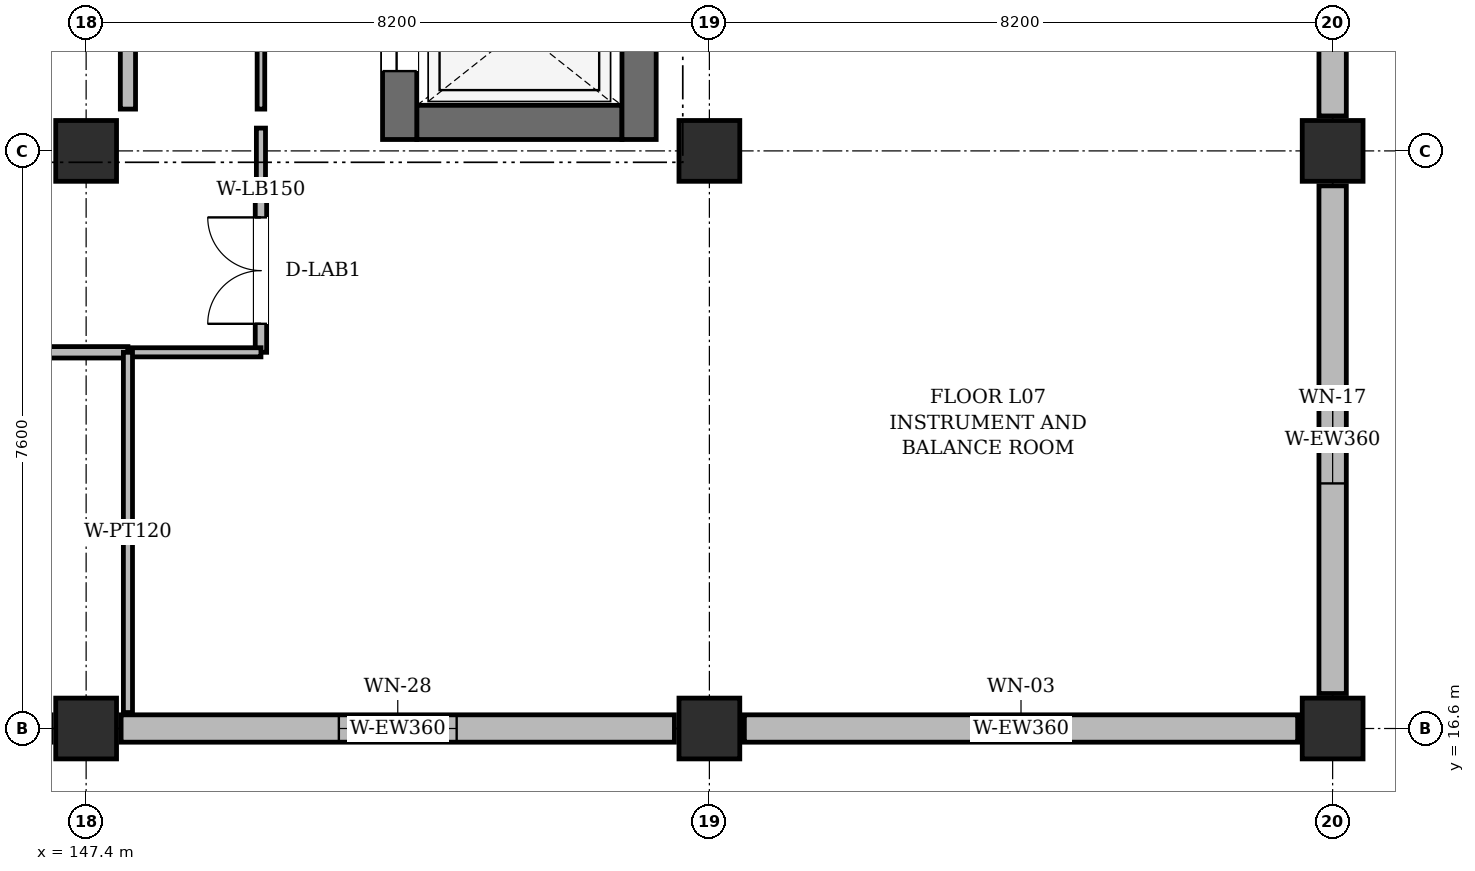
"""IFC4 building model, lengths in metres.
Left out: names, types, materials, properties, quantities, classifications, styles, units other than length and angle.
Written with IfcOpenShell. Run it as: python <this file> out.ifc"""

import sys

from ifc_helpers import new_model, si_unit, direction, frame, frame_2d, origin, origin_2d, place, context, subcontext, project, spatial, rectangle, extrude, element, fill, save


model = new_model("IFC4")
c1 = context("Model", 3, precision=1e-05, world=origin(), true_north=direction((0.0, 1.0)))
c2 = subcontext(c1, "Body", "Model", "MODEL_VIEW")
j1 = project(units=[si_unit("LENGTHUNIT", "METRE"), si_unit("PLANEANGLEUNIT", "RADIAN")], contexts=[c1])
p1 = place(None, origin())
s1 = spatial("IfcSite", under=j1, at=p1, CompositionType="ELEMENT")
p2 = place(p1, origin())
s2 = spatial("IfcBuilding", under=s1, at=p2, CompositionType="ELEMENT")
p3 = place(p2, frame((0.0, 0.0, 32.4)))
s3 = spatial("IfcBuildingStorey", under=s2, at=p3, CompositionType="ELEMENT", Elevation=32.4)
for number, where, z_axis, x_axis in (
    (1, (147.4, 16.6, 0.0), (0.0, 0.0, 1.0), (1.0, 0.0, 0.0)),
    (2, (147.4, 24.2, 0.0), (0.0, 0.0, 1.0), (1.0, 0.0, 0.0)),
    (3, (155.6, 16.6, 0.0), (0.0, 0.0, 1.0), (1.0, 0.0, 0.0)),
    (4, (155.6, 24.2, 0.0), (0.0, 0.0, 1.0), (1.0, 0.0, 0.0)),
    (5, (163.8, 16.6, 0.0), (0.0, 0.0, 1.0), (1.0, 0.0, 0.0)),
    (6, (163.8, 24.2, 0.0), (0.0, 0.0, 1.0), (1.0, 0.0, 0.0)),
):
    element("IfcColumn", number, at=place(p3, frame(where, z_axis=z_axis, x_axis=x_axis)), inside=s3, PredefinedType="COLUMN", context=c2, shape_type="SweptSolid", body=[
        extrude(rectangle(XDim=0.8, YDim=0.8, at=origin_2d()), origin(), (0.0, 0.0, 1.0), 3.89),
    ])
p4 = place(p3, frame((147.86, 16.6, 0.0), z_axis=(0.0, 0.0, 1.0), x_axis=(1.0, 0.0, 0.0)))
e7 = element("IfcWall", 7, at=p4, inside=s3, PredefinedType="SOLIDWALL", context=c2, shape_type="SweptSolid", body=[
    extrude(rectangle(XDim=7.28, YDim=0.36, at=frame_2d((3.64, 0.0))), origin(), (0.0, 0.0, 1.0), 3.275),
])
p5 = place(p4, frame((2.865, 0.0, 0.95)))
e8 = element("IfcOpeningElement", 8, at=p5, cuts=e7, PredefinedType="OPENING", context=c2, shape_type="SweptSolid", body=[
    extrude(rectangle(XDim=1.55, YDim=2.05, at=frame_2d((0.775, 1.025))), frame((0.0, 0.192, 0.0), z_axis=(0.0, -1.0, 0.0), x_axis=(1.0, 0.0, 0.0)), (0.0, 0.0, 1.0), 0.384),
])
p6 = place(p3, frame((156.06, 16.6, 0.0), z_axis=(0.0, 0.0, 1.0), x_axis=(1.0, 0.0, 0.0)))
e9 = element("IfcWall", 9, at=p6, inside=s3, PredefinedType="SOLIDWALL", context=c2, shape_type="SweptSolid", body=[
    extrude(rectangle(XDim=7.28, YDim=0.36, at=frame_2d((3.64, 0.0))), origin(), (0.0, 0.0, 1.0), 3.275),
])
p7 = place(p6, frame((3.265, 0.0, 0.95)))
e10 = element("IfcOpeningElement", 10, at=p7, cuts=e9, PredefinedType="OPENING", context=c2, shape_type="SweptSolid", body=[
    extrude(rectangle(XDim=0.75, YDim=1.8, at=frame_2d((0.375, 0.9))), frame((0.0, 0.192, 0.0), z_axis=(0.0, -1.0, 0.0), x_axis=(1.0, 0.0, 0.0)), (0.0, 0.0, 1.0), 0.384),
])
p8 = place(p3, frame((163.8, 17.06, 0.0), z_axis=(0.0, 0.0, 1.0), x_axis=(0.0, 1.0, 0.0)))
e11 = element("IfcWall", 11, at=p8, inside=s3, PredefinedType="SOLIDWALL", context=c2, shape_type="SweptSolid", body=[
    extrude(rectangle(XDim=6.68, YDim=0.36, at=frame_2d((3.34, 0.0))), origin(), (0.0, 0.0, 1.0), 3.275),
])
p9 = place(p8, frame((2.765, 0.0, 0.95)))
e12 = element("IfcOpeningElement", 12, at=p9, cuts=e11, PredefinedType="OPENING", context=c2, shape_type="SweptSolid", body=[
    extrude(rectangle(XDim=1.15, YDim=1.25, at=frame_2d((0.575, 0.625))), frame((0.0, 0.192, 0.0), z_axis=(0.0, -1.0, 0.0), x_axis=(1.0, 0.0, 0.0)), (0.0, 0.0, 1.0), 0.384),
])
p10 = place(p3, frame((163.8, 24.66, 0.0), z_axis=(0.0, 0.0, 1.0), x_axis=(0.0, 1.0, 0.0)))
e13 = element("IfcWall", 13, at=p10, inside=s3, PredefinedType="SOLIDWALL", context=c2, shape_type="SweptSolid", body=[
    extrude(rectangle(XDim=6.68, YDim=0.36, at=frame_2d((3.34, 0.0))), origin(), (0.0, 0.0, 1.0), 3.275),
])
p11 = place(p10, frame((2.765, 0.0, 0.95)))
e14 = element("IfcOpeningElement", 14, at=p11, cuts=e13, PredefinedType="OPENING", context=c2, shape_type="SweptSolid", body=[
    extrude(rectangle(XDim=1.15, YDim=2.05, at=frame_2d((0.575, 1.025))), frame((0.0, 0.192, 0.0), z_axis=(0.0, -1.0, 0.0), x_axis=(1.0, 0.0, 0.0)), (0.0, 0.0, 1.0), 0.384),
])
p12 = place(p3, frame((151.75, 24.575, 0.0), z_axis=(0.0, 0.0, 1.0), x_axis=(1.0, 0.0, 0.0)))
e15 = element("IfcWall", 15, at=p12, inside=s3, PredefinedType="SHEAR", context=c2, shape_type="SweptSolid", body=[
    extrude(rectangle(XDim=2.7, YDim=0.45, at=frame_2d((1.35, 0.0))), origin(), (0.0, 0.0, 1.0), 3.89),
])
p13 = place(p3, frame((151.525, 24.35, 0.0), z_axis=(0.0, 0.0, 1.0), x_axis=(0.0, 1.0, 0.0)))
e16 = element("IfcWall", 16, at=p13, inside=s3, PredefinedType="SHEAR", context=c2, shape_type="SweptSolid", body=[
    extrude(rectangle(XDim=2.9, YDim=0.45, at=frame_2d((1.45, 0.0))), origin(), (0.0, 0.0, 1.0), 3.89),
])
p14 = place(p13, frame((0.9, 0.0, 0.0)))
e17 = element("IfcOpeningElement", 17, at=p14, cuts=e16, PredefinedType="OPENING", context=c2, shape_type="SweptSolid", body=[
    extrude(rectangle(XDim=1.1, YDim=2.2, at=frame_2d((0.55, 1.1))), frame((0.0, 0.237, 0.0), z_axis=(0.0, -1.0, 0.0), x_axis=(1.0, 0.0, 0.0)), (0.0, 0.0, 1.0), 0.474),
])
p15 = place(p3, frame((154.675, 24.35, 0.0), z_axis=(0.0, 0.0, 1.0), x_axis=(0.0, 1.0, 0.0)))
e18 = element("IfcWall", 18, at=p15, inside=s3, PredefinedType="SHEAR", context=c2, shape_type="SweptSolid", body=[
    extrude(rectangle(XDim=2.9, YDim=0.45, at=frame_2d((1.45, 0.0))), origin(), (0.0, 0.0, 1.0), 3.89),
])
p16 = place(p3, frame((147.95, 31.75, 0.0), z_axis=(0.0, 0.0, 1.0), x_axis=(0.0, -1.0, 0.0)))
e19 = element("IfcWall", 19, at=p16, inside=s3, PredefinedType="PARTITIONING", context=c2, shape_type="SweptSolid", body=[
    extrude(rectangle(XDim=7.0, YDim=0.2, at=frame_2d((3.5, 0.0))), origin(), (0.0, 0.0, 1.0), 3.805),
])
p17 = place(p16, frame((2.75, 0.0, 0.0)))
e20 = element("IfcOpeningElement", 20, at=p17, cuts=e19, PredefinedType="OPENING", context=c2, shape_type="SweptSolid", body=[
    extrude(rectangle(XDim=1.5, YDim=2.2, at=frame_2d((0.75, 1.1))), frame((0.0, 0.112, 0.0), z_axis=(0.0, -1.0, 0.0), x_axis=(1.0, 0.0, 0.0)), (0.0, 0.0, 1.0), 0.224),
])
p18 = place(p3, frame((149.7, 24.75, 0.0), z_axis=(0.0, 0.0, 1.0), x_axis=(0.0, 1.0, 0.0)))
e21 = element("IfcWall", 21, at=p18, inside=s3, PredefinedType="PARTITIONING", context=c2, shape_type="SweptSolid", body=[
    extrude(rectangle(XDim=11.3, YDim=0.1, at=frame_2d((5.65, 0.0))), origin(), (0.0, 0.0, 1.0), 3.805),
])
p19 = place(p18, frame((4.75, 0.0, 0.0)))
e22 = element("IfcOpeningElement", 22, at=p19, cuts=e21, PredefinedType="OPENING", context=c2, shape_type="SweptSolid", body=[
    extrude(rectangle(XDim=1.8, YDim=2.4, at=frame_2d((0.9, 1.2))), frame((0.0, 0.062, 0.0), z_axis=(0.0, -1.0, 0.0), x_axis=(1.0, 0.0, 0.0)), (0.0, 0.0, 1.0), 0.124),
])
p20 = place(p3, frame((147.95, 21.55, 0.0), z_axis=(0.0, 0.0, 1.0), x_axis=(-1.0, 0.0, 0.0)))
e23 = element("IfcWall", 23, at=p20, inside=s3, PredefinedType="PARTITIONING", context=c2, shape_type="SweptSolid", body=[
    extrude(rectangle(XDim=16.95, YDim=0.15, at=frame_2d((8.475, 0.0))), origin(), (0.0, 0.0, 1.0), 3.465),
])
p21 = place(p20, frame((7.775, 0.0, 0.0)))
e24 = element("IfcOpeningElement", 24, at=p21, cuts=e23, PredefinedType="OPENING", context=c2, shape_type="SweptSolid", body=[
    extrude(rectangle(XDim=1.4, YDim=2.2, at=frame_2d((0.7, 1.1))), frame((0.0, 0.087, 0.0), z_axis=(0.0, -1.0, 0.0), x_axis=(1.0, 0.0, 0.0)), (0.0, 0.0, 1.0), 0.174),
])
p22 = place(p3, frame((149.7, 24.5, 0.0), z_axis=(0.0, 0.0, 1.0), x_axis=(0.0, -1.0, 0.0)))
e25 = element("IfcWall", 25, at=p22, inside=s3, PredefinedType="PARTITIONING", context=c2, shape_type="SweptSolid", body=[
    extrude(rectangle(XDim=0.8, YDim=0.12, at=frame_2d((0.4, 0.0))), origin(), (0.0, 0.0, 1.0), 3.805),
])
p23 = place(p3, frame((149.7, 23.7, 0.0), z_axis=(0.0, 0.0, 1.0), x_axis=(0.0, -1.0, 0.0)))
e26 = element("IfcWall", 26, at=p23, inside=s3, PredefinedType="PARTITIONING", context=c2, shape_type="SweptSolid", body=[
    extrude(rectangle(XDim=2.15, YDim=0.15, at=frame_2d((1.075, 0.0))), origin(), (0.0, 0.0, 1.0), 3.805),
])
p24 = place(p23, frame((0.375, 0.0, 0.0)))
e27 = element("IfcOpeningElement", 27, at=p24, cuts=e26, PredefinedType="OPENING", context=c2, shape_type="SweptSolid", body=[
    extrude(rectangle(XDim=1.4, YDim=2.2, at=frame_2d((0.7, 1.1))), frame((0.0, 0.087, 0.0), z_axis=(0.0, -1.0, 0.0), x_axis=(1.0, 0.0, 0.0)), (0.0, 0.0, 1.0), 0.174),
])
p25 = place(p3, frame((149.7, 21.55, 0.0), z_axis=(0.0, 0.0, 1.0), x_axis=(-1.0, 0.0, 0.0)))
e28 = element("IfcWall", 28, at=p25, inside=s3, PredefinedType="PARTITIONING", context=c2, shape_type="SweptSolid", body=[
    extrude(rectangle(XDim=1.75, YDim=0.12, at=frame_2d((0.875, 0.0))), origin(), (0.0, 0.0, 1.0), 3.465),
])
p26 = place(p3, frame((147.95, 21.55, 0.0), z_axis=(0.0, 0.0, 1.0), x_axis=(0.0, -1.0, 0.0)))
e29 = element("IfcWall", 29, at=p26, inside=s3, PredefinedType="PARTITIONING", context=c2, shape_type="SweptSolid", body=[
    extrude(rectangle(XDim=4.74, YDim=0.12, at=frame_2d((2.37, 0.0))), origin(), (0.0, 0.0, 1.0), 3.805),
])
p27 = place(p5, origin())
e30 = element("IfcWindow", 30, at=p27, inside=s3, PartitioningType="DOUBLE_PANEL_VERTICAL", PredefinedType="WINDOW", context=c2, shape_type="SweptSolid", body=[
    extrude(rectangle(XDim=1.55, YDim=2.05, at=frame_2d((0.775, 1.025))), frame((0.0, 0.03, 0.0), z_axis=(0.0, -1.0, 0.0), x_axis=(1.0, 0.0, 0.0)), (0.0, 0.0, 1.0), 0.06),
])
fill(e8, e30)
p28 = place(p7, origin())
e31 = element("IfcWindow", 31, at=p28, inside=s3, PartitioningType="SINGLE_PANEL", PredefinedType="WINDOW", context=c2, shape_type="SweptSolid", body=[
    extrude(rectangle(XDim=0.75, YDim=1.8, at=frame_2d((0.375, 0.9))), frame((0.0, 0.03, 0.0), z_axis=(0.0, -1.0, 0.0), x_axis=(1.0, 0.0, 0.0)), (0.0, 0.0, 1.0), 0.06),
])
fill(e10, e31)
p29 = place(p9, origin())
e32 = element("IfcWindow", 32, at=p29, inside=s3, PartitioningType="SINGLE_PANEL", PredefinedType="WINDOW", context=c2, shape_type="SweptSolid", body=[
    extrude(rectangle(XDim=1.15, YDim=1.25, at=frame_2d((0.575, 0.625))), frame((0.0, 0.03, 0.0), z_axis=(0.0, -1.0, 0.0), x_axis=(1.0, 0.0, 0.0)), (0.0, 0.0, 1.0), 0.06),
])
fill(e12, e32)
p30 = place(p14, origin())
e33 = element("IfcDoor", 33, at=p30, inside=s3, OperationType="DOUBLE_DOOR_SLIDING", PredefinedType="DOOR", context=c2, shape_type="SweptSolid", body=[
    extrude(rectangle(XDim=1.1, YDim=2.2, at=frame_2d((0.55, 1.1))), frame((0.0, 0.025, 0.0), z_axis=(0.0, -1.0, 0.0), x_axis=(1.0, 0.0, 0.0)), (0.0, 0.0, 1.0), 0.05),
])
fill(e17, e33)
p31 = place(p24, frame((1.4, 0.0, 0.0), z_axis=(0.0, 0.0, 1.0), x_axis=(-1.0, 0.0, 0.0)))
e34 = element("IfcDoor", 34, at=p31, inside=s3, OperationType="DOUBLE_DOOR_SINGLE_SWING", PredefinedType="DOOR", context=c2, shape_type="SweptSolid", body=[
    extrude(rectangle(XDim=1.4, YDim=2.2, at=frame_2d((0.7, 1.1))), frame((0.0, 0.025, 0.0), z_axis=(0.0, -1.0, 0.0), x_axis=(1.0, 0.0, 0.0)), (0.0, 0.0, 1.0), 0.05),
])
fill(e27, e34)
save(model, sys.argv[1])
